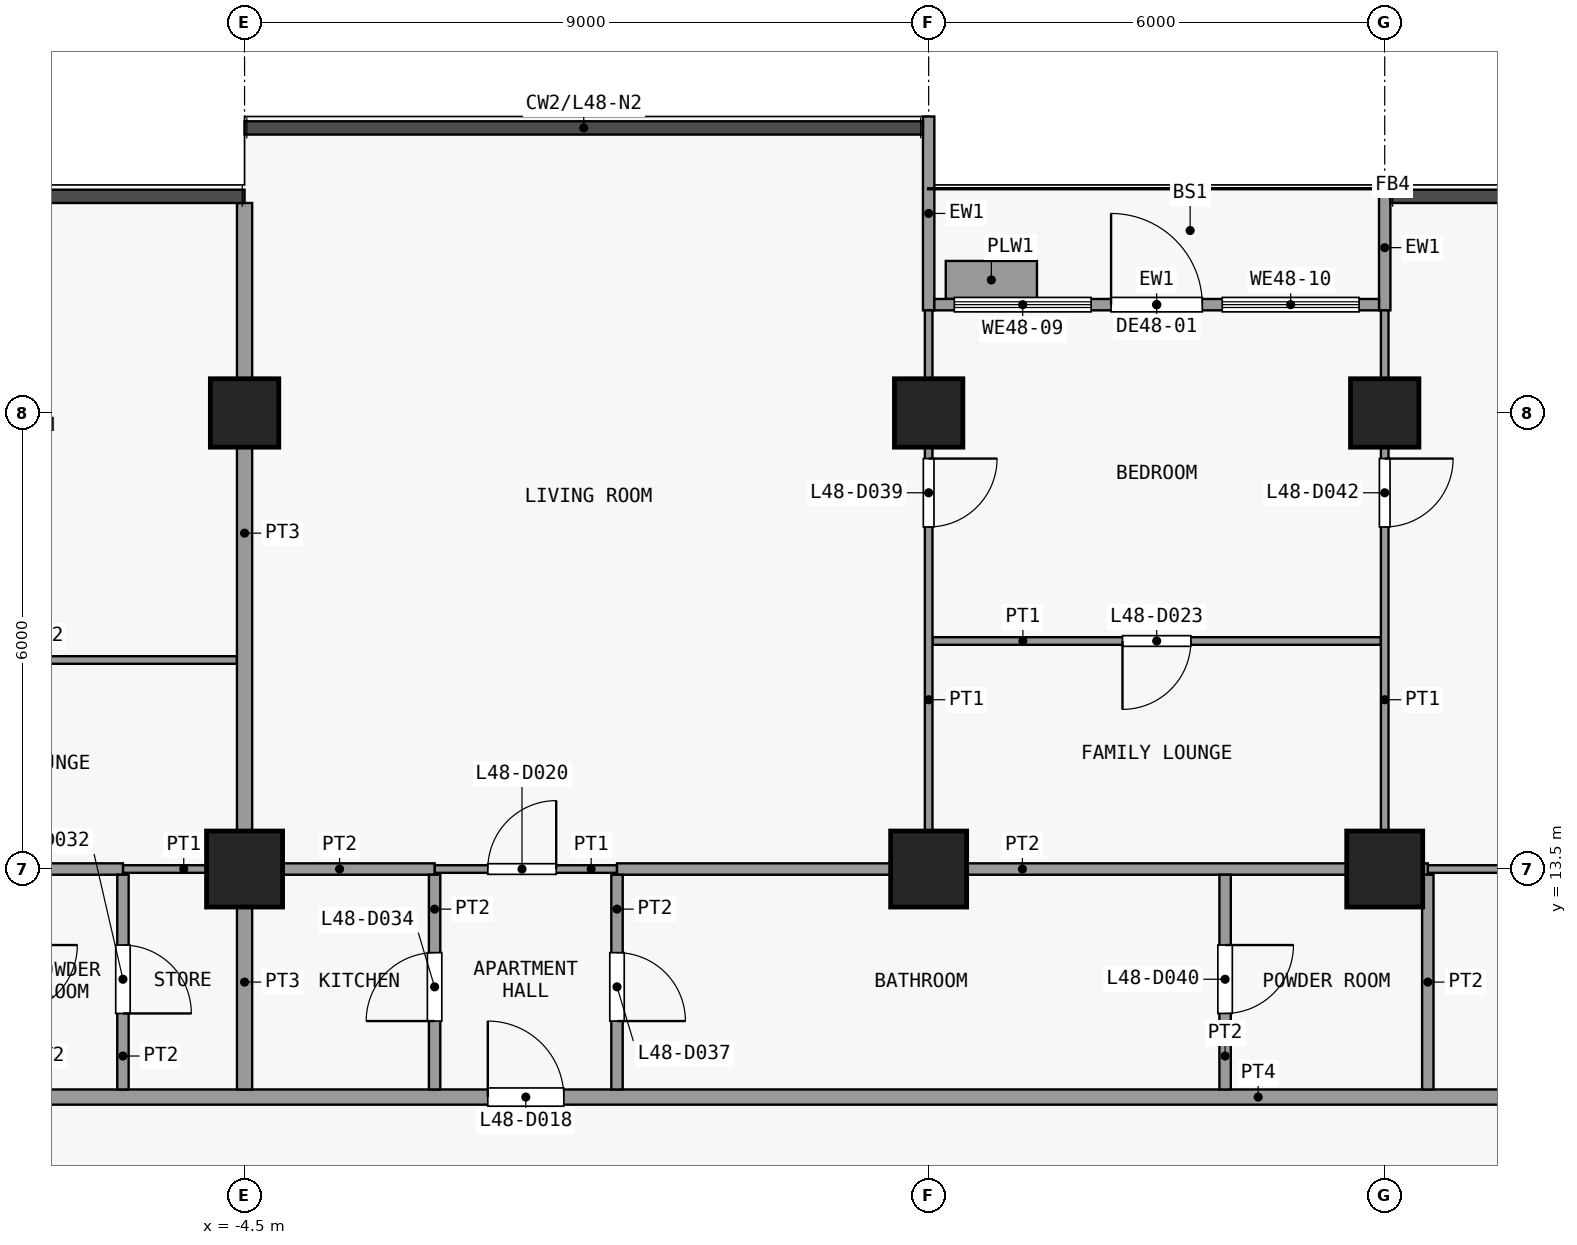
"""IFC4 building model, lengths in metres.
Left out: names, types, materials, properties, quantities, classifications, styles, units other than length and angle.
Written with IfcOpenShell. Run it as: python <this file> out.ifc"""

import sys

from ifc_helpers import new_model, si_unit, direction, frame, frame_2d, origin, origin_2d, place, context, subcontext, project, spatial, rectangle, extrude, element, fill, save


model = new_model("IFC4")
c1 = context("Model", 3, precision=1e-05, world=origin(), true_north=direction((0.0, 1.0)))
c2 = subcontext(c1, "Body", "Model", "MODEL_VIEW")
j1 = project(units=[si_unit("LENGTHUNIT", "METRE"), si_unit("PLANEANGLEUNIT", "RADIAN")], contexts=[c1])
p1 = place(None, origin())
s1 = spatial("IfcSite", under=j1, at=p1, CompositionType="ELEMENT")
p2 = place(p1, origin())
s2 = spatial("IfcBuilding", under=s1, at=p2, CompositionType="ELEMENT")
p3 = place(p2, frame((0.0, 0.0, 192.5)))
s3 = spatial("IfcBuildingStorey", under=s2, at=p3, CompositionType="ELEMENT", Elevation=192.5)
p4 = place(p3, frame((-4.5, 13.5, 0.0), z_axis=(0.0, 0.0, 1.0), x_axis=(1.0, 0.0, 0.0)))
e1 = element("IfcColumn", 1, at=p4, inside=s3, PredefinedType="COLUMN", context=c2, shape_type="SweptSolid", body=[
    extrude(rectangle(XDim=1.0, YDim=1.0, at=origin_2d()), origin(), (0.0, 0.0, 1.0), 3.6),
])
p5 = place(p3, frame((-4.5, 19.5, 0.0), z_axis=(0.0, 0.0, 1.0), x_axis=(1.0, 0.0, 0.0)))
e2 = element("IfcColumn", 2, at=p5, inside=s3, PredefinedType="COLUMN", context=c2, shape_type="SweptSolid", body=[
    extrude(rectangle(XDim=0.9, YDim=0.9, at=origin_2d()), origin(), (0.0, 0.0, 1.0), 3.6),
])
p6 = place(p3, frame((4.5, 13.5, 0.0), z_axis=(0.0, 0.0, 1.0), x_axis=(1.0, 0.0, 0.0)))
e3 = element("IfcColumn", 3, at=p6, inside=s3, PredefinedType="COLUMN", context=c2, shape_type="SweptSolid", body=[
    extrude(rectangle(XDim=1.0, YDim=1.0, at=origin_2d()), origin(), (0.0, 0.0, 1.0), 3.6),
])
p7 = place(p3, frame((4.5, 19.5, 0.0), z_axis=(0.0, 0.0, 1.0), x_axis=(1.0, 0.0, 0.0)))
e4 = element("IfcColumn", 4, at=p7, inside=s3, PredefinedType="COLUMN", context=c2, shape_type="SweptSolid", body=[
    extrude(rectangle(XDim=0.9, YDim=0.9, at=origin_2d()), origin(), (0.0, 0.0, 1.0), 3.6),
])
p8 = place(p3, frame((10.5, 13.5, 0.0), z_axis=(0.0, 0.0, 1.0), x_axis=(1.0, 0.0, 0.0)))
e5 = element("IfcColumn", 5, at=p8, inside=s3, PredefinedType="COLUMN", context=c2, shape_type="SweptSolid", body=[
    extrude(rectangle(XDim=1.0, YDim=1.0, at=origin_2d()), origin(), (0.0, 0.0, 1.0), 3.6),
])
p9 = place(p3, frame((10.5, 19.5, 0.0), z_axis=(0.0, 0.0, 1.0), x_axis=(1.0, 0.0, 0.0)))
e6 = element("IfcColumn", 6, at=p9, inside=s3, PredefinedType="COLUMN", context=c2, shape_type="SweptSolid", body=[
    extrude(rectangle(XDim=0.9, YDim=0.9, at=origin_2d()), origin(), (0.0, 0.0, 1.0), 3.6),
])
p10 = place(p3, frame((4.5, 20.85, 0.0), z_axis=(0.0, 0.0, 1.0), x_axis=(0.0, 1.0, 0.0)))
e7 = element("IfcWall", 7, at=p10, inside=s3, PredefinedType="SOLIDWALL", context=c2, shape_type="SweptSolid", body=[
    extrude(rectangle(XDim=2.55, YDim=0.15, at=frame_2d((1.275, 0.0))), origin(), (0.0, 0.0, 1.0), 3.3),
])
p11 = place(p3, frame((10.5, 20.85, 0.0), z_axis=(0.0, 0.0, 1.0), x_axis=(0.0, 1.0, 0.0)))
e8 = element("IfcWall", 8, at=p11, inside=s3, PredefinedType="SOLIDWALL", context=c2, shape_type="SweptSolid", body=[
    extrude(rectangle(XDim=1.65, YDim=0.15, at=frame_2d((0.825, 0.0))), origin(), (0.0, 0.0, 1.0), 3.3),
])
p12 = place(p3, frame((4.575, 20.925, 0.0), z_axis=(0.0, 0.0, 1.0), x_axis=(1.0, 0.0, 0.0)))
e9 = element("IfcWall", 9, at=p12, inside=s3, PredefinedType="SOLIDWALL", context=c2, shape_type="SweptSolid", body=[
    extrude(rectangle(XDim=5.85, YDim=0.15, at=frame_2d((2.925, 0.0))), origin(), (0.0, 0.0, 1.0), 3.3),
])
p13 = place(p12, frame((2.325, 0.0, 0.0)))
e10 = element("IfcOpeningElement", 10, at=p13, cuts=e9, PredefinedType="OPENING", context=c2, shape_type="SweptSolid", body=[
    extrude(rectangle(XDim=1.2, YDim=2.4, at=frame_2d((0.6, 1.2))), frame((0.0, 0.085, 0.0), z_axis=(0.0, -1.0, 0.0), x_axis=(1.0, 0.0, 0.0)), (0.0, 0.0, 1.0), 0.17),
])
p14 = place(p12, frame((0.262, 0.0, 0.9)))
e11 = element("IfcOpeningElement", 11, at=p14, cuts=e9, PredefinedType="OPENING", context=c2, shape_type="SweptSolid", body=[
    extrude(rectangle(XDim=1.8, YDim=2.1, at=frame_2d((0.9, 1.05))), frame((0.0, 0.085, 0.0), z_axis=(0.0, -1.0, 0.0), x_axis=(1.0, 0.0, 0.0)), (0.0, 0.0, 1.0), 0.17),
])
p15 = place(p12, frame((3.788, 0.0, 0.9)))
e12 = element("IfcOpeningElement", 12, at=p15, cuts=e9, PredefinedType="OPENING", context=c2, shape_type="SweptSolid", body=[
    extrude(rectangle(XDim=1.8, YDim=2.1, at=frame_2d((0.9, 1.05))), frame((0.0, 0.085, 0.0), z_axis=(0.0, -1.0, 0.0), x_axis=(1.0, 0.0, 0.0)), (0.0, 0.0, 1.0), 0.17),
])
p16 = place(p3, frame((4.725, 21.25, 0.0), z_axis=(0.0, 0.0, 1.0), x_axis=(1.0, 0.0, 0.0)))
e13 = element("IfcWall", 13, at=p16, inside=s3, PredefinedType="USERDEFINED", context=c2, shape_type="SweptSolid", body=[
    extrude(rectangle(XDim=1.2, YDim=0.5, at=frame_2d((0.6, 0.0))), origin(), (0.0, 0.0, 1.0), 0.9),
])
p17 = place(p3, frame((-19.35, 10.5, 0.0), z_axis=(0.0, 0.0, 1.0), x_axis=(1.0, 0.0, 0.0)))
e14 = element("IfcWall", 14, at=p17, inside=s3, PredefinedType="PARTITIONING", context=c2, shape_type="SweptSolid", body=[
    extrude(rectangle(XDim=37.2, YDim=0.2, at=frame_2d((18.6, 0.0))), origin(), (0.0, 0.0, 1.0), 3.3),
])
p18 = place(p17, frame((7.05, 0.0, 0.0)))
e15 = element("IfcOpeningElement", 15, at=p18, cuts=e14, PredefinedType="OPENING", context=c2, shape_type="SweptSolid", body=[
    extrude(rectangle(XDim=1.0, YDim=2.1, at=frame_2d((0.5, 1.05))), frame((0.0, 0.11, 0.0), z_axis=(0.0, -1.0, 0.0), x_axis=(1.0, 0.0, 0.0)), (0.0, 0.0, 1.0), 0.22),
])
p19 = place(p17, frame((18.05, 0.0, 0.0)))
e16 = element("IfcOpeningElement", 16, at=p19, cuts=e14, PredefinedType="OPENING", context=c2, shape_type="SweptSolid", body=[
    extrude(rectangle(XDim=1.0, YDim=2.1, at=frame_2d((0.5, 1.05))), frame((0.0, 0.11, 0.0), z_axis=(0.0, -1.0, 0.0), x_axis=(1.0, 0.0, 0.0)), (0.0, 0.0, 1.0), 0.22),
])
p20 = place(p3, frame((-6.1, 13.5, 0.0), z_axis=(0.0, 0.0, 1.0), x_axis=(1.0, 0.0, 0.0)))
e17 = element("IfcWall", 17, at=p20, inside=s3, PredefinedType="PARTITIONING", context=c2, shape_type="SweptSolid", body=[
    extrude(rectangle(XDim=1.6, YDim=0.1, at=frame_2d((0.8, 0.0))), origin(), (0.0, 0.0, 1.0), 3.3),
])
p21 = place(p3, frame((-2.0, 13.5, 0.0), z_axis=(0.0, 0.0, 1.0), x_axis=(1.0, 0.0, 0.0)))
e18 = element("IfcWall", 18, at=p21, inside=s3, PredefinedType="PARTITIONING", context=c2, shape_type="SweptSolid", body=[
    extrude(rectangle(XDim=2.4, YDim=0.1, at=frame_2d((1.2, 0.0))), origin(), (0.0, 0.0, 1.0), 3.3),
])
p22 = place(p21, frame((0.7, 0.0, 0.0)))
e19 = element("IfcOpeningElement", 19, at=p22, cuts=e18, PredefinedType="OPENING", context=c2, shape_type="SweptSolid", body=[
    extrude(rectangle(XDim=0.9, YDim=2.1, at=frame_2d((0.45, 1.05))), frame((0.0, 0.06, 0.0), z_axis=(0.0, -1.0, 0.0), x_axis=(1.0, 0.0, 0.0)), (0.0, 0.0, 1.0), 0.12),
])
p23 = place(p3, frame((11.067, 13.5, 0.0), z_axis=(0.0, 0.0, 1.0), x_axis=(1.0, 0.0, 0.0)))
e20 = element("IfcWall", 20, at=p23, inside=s3, PredefinedType="PARTITIONING", context=c2, shape_type="SweptSolid", body=[
    extrude(rectangle(XDim=6.783, YDim=0.1, at=frame_2d((3.392, 0.0))), origin(), (0.0, 0.0, 1.0), 3.3),
])
p24 = place(p23, frame((2.9, 0.0, 0.0)))
e21 = element("IfcOpeningElement", 21, at=p24, cuts=e20, PredefinedType="OPENING", context=c2, shape_type="SweptSolid", body=[
    extrude(rectangle(XDim=0.9, YDim=2.1, at=frame_2d((0.45, 1.05))), frame((0.0, 0.06, 0.0), z_axis=(0.0, -1.0, 0.0), x_axis=(1.0, 0.0, 0.0)), (0.0, 0.0, 1.0), 0.12),
])
p25 = place(p3, frame((-10.5, 13.5, 0.0), z_axis=(0.0, 0.0, 1.0), x_axis=(1.0, 0.0, 0.0)))
e22 = element("IfcWall", 22, at=p25, inside=s3, PredefinedType="PARTITIONING", context=c2, shape_type="SweptSolid", body=[
    extrude(rectangle(XDim=4.4, YDim=0.15, at=frame_2d((2.2, 0.0))), origin(), (0.0, 0.0, 1.0), 3.3),
])
p26 = place(p3, frame((-4.5, 13.5, 0.0), z_axis=(0.0, 0.0, 1.0), x_axis=(1.0, 0.0, 0.0)))
e23 = element("IfcWall", 23, at=p26, inside=s3, PredefinedType="PARTITIONING", context=c2, shape_type="SweptSolid", body=[
    extrude(rectangle(XDim=2.5, YDim=0.15, at=frame_2d((1.25, 0.0))), origin(), (0.0, 0.0, 1.0), 3.3),
])
p27 = place(p3, frame((0.4, 13.5, 0.0), z_axis=(0.0, 0.0, 1.0), x_axis=(1.0, 0.0, 0.0)))
e24 = element("IfcWall", 24, at=p27, inside=s3, PredefinedType="PARTITIONING", context=c2, shape_type="SweptSolid", body=[
    extrude(rectangle(XDim=10.667, YDim=0.15, at=frame_2d((5.333, 0.0))), origin(), (0.0, 0.0, 1.0), 3.3),
])
p28 = place(p3, frame((-10.45, 16.25, 0.0), z_axis=(0.0, 0.0, 1.0), x_axis=(1.0, 0.0, 0.0)))
e25 = element("IfcWall", 25, at=p28, inside=s3, PredefinedType="PARTITIONING", context=c2, shape_type="SweptSolid", body=[
    extrude(rectangle(XDim=5.85, YDim=0.1, at=frame_2d((2.925, 0.0))), origin(), (0.0, 0.0, 1.0), 3.3),
])
p29 = place(p28, frame((2.5, 0.0, 0.0)))
e26 = element("IfcOpeningElement", 26, at=p29, cuts=e25, PredefinedType="OPENING", context=c2, shape_type="SweptSolid", body=[
    extrude(rectangle(XDim=0.9, YDim=2.1, at=frame_2d((0.45, 1.05))), frame((0.0, 0.06, 0.0), z_axis=(0.0, -1.0, 0.0), x_axis=(1.0, 0.0, 0.0)), (0.0, 0.0, 1.0), 0.12),
])
p30 = place(p3, frame((4.55, 16.5, 0.0), z_axis=(0.0, 0.0, 1.0), x_axis=(1.0, 0.0, 0.0)))
e27 = element("IfcWall", 27, at=p30, inside=s3, PredefinedType="PARTITIONING", context=c2, shape_type="SweptSolid", body=[
    extrude(rectangle(XDim=5.9, YDim=0.1, at=frame_2d((2.95, 0.0))), origin(), (0.0, 0.0, 1.0), 3.3),
])
p31 = place(p30, frame((2.5, 0.0, 0.0)))
e28 = element("IfcOpeningElement", 28, at=p31, cuts=e27, PredefinedType="OPENING", context=c2, shape_type="SweptSolid", body=[
    extrude(rectangle(XDim=0.9, YDim=2.1, at=frame_2d((0.45, 1.05))), frame((0.0, 0.06, 0.0), z_axis=(0.0, -1.0, 0.0), x_axis=(1.0, 0.0, 0.0)), (0.0, 0.0, 1.0), 0.12),
])
p32 = place(p3, frame((-6.1, 10.6, 0.0), z_axis=(0.0, 0.0, 1.0), x_axis=(0.0, 1.0, 0.0)))
e29 = element("IfcWall", 29, at=p32, inside=s3, PredefinedType="PARTITIONING", context=c2, shape_type="SweptSolid", body=[
    extrude(rectangle(XDim=2.825, YDim=0.15, at=frame_2d((1.413, 0.0))), origin(), (0.0, 0.0, 1.0), 3.3),
])
p33 = place(p32, frame((1.0, 0.0, 0.0)))
e30 = element("IfcOpeningElement", 30, at=p33, cuts=e29, PredefinedType="OPENING", context=c2, shape_type="SweptSolid", body=[
    extrude(rectangle(XDim=0.9, YDim=2.1, at=frame_2d((0.45, 1.05))), frame((0.0, 0.085, 0.0), z_axis=(0.0, -1.0, 0.0), x_axis=(1.0, 0.0, 0.0)), (0.0, 0.0, 1.0), 0.17),
])
p34 = place(p3, frame((-4.5, 10.6, 0.0), z_axis=(0.0, 0.0, 1.0), x_axis=(0.0, 1.0, 0.0)))
e31 = element("IfcWall", 31, at=p34, inside=s3, PredefinedType="PARTITIONING", context=c2, shape_type="SweptSolid", body=[
    extrude(rectangle(XDim=2.825, YDim=0.2, at=frame_2d((1.413, 0.0))), origin(), (0.0, 0.0, 1.0), 3.3),
])
p35 = place(p3, frame((-4.5, 13.575, 0.0), z_axis=(0.0, 0.0, 1.0), x_axis=(0.0, 1.0, 0.0)))
e32 = element("IfcWall", 32, at=p35, inside=s3, PredefinedType="PARTITIONING", context=c2, shape_type="SweptSolid", body=[
    extrude(rectangle(XDim=8.688, YDim=0.2, at=frame_2d((4.344, 0.0))), origin(), (0.0, 0.0, 1.0), 3.3),
])
p36 = place(p3, frame((-2.0, 10.6, 0.0), z_axis=(0.0, 0.0, 1.0), x_axis=(0.0, 1.0, 0.0)))
e33 = element("IfcWall", 33, at=p36, inside=s3, PredefinedType="PARTITIONING", context=c2, shape_type="SweptSolid", body=[
    extrude(rectangle(XDim=2.825, YDim=0.15, at=frame_2d((1.413, 0.0))), origin(), (0.0, 0.0, 1.0), 3.3),
])
p37 = place(p36, frame((0.9, 0.0, 0.0)))
e34 = element("IfcOpeningElement", 34, at=p37, cuts=e33, PredefinedType="OPENING", context=c2, shape_type="SweptSolid", body=[
    extrude(rectangle(XDim=0.9, YDim=2.1, at=frame_2d((0.45, 1.05))), frame((0.0, 0.085, 0.0), z_axis=(0.0, -1.0, 0.0), x_axis=(1.0, 0.0, 0.0)), (0.0, 0.0, 1.0), 0.17),
])
p38 = place(p3, frame((0.4, 10.6, 0.0), z_axis=(0.0, 0.0, 1.0), x_axis=(0.0, 1.0, 0.0)))
e35 = element("IfcWall", 35, at=p38, inside=s3, PredefinedType="PARTITIONING", context=c2, shape_type="SweptSolid", body=[
    extrude(rectangle(XDim=2.825, YDim=0.15, at=frame_2d((1.413, 0.0))), origin(), (0.0, 0.0, 1.0), 3.3),
])
p39 = place(p38, frame((0.9, 0.0, 0.0)))
e36 = element("IfcOpeningElement", 36, at=p39, cuts=e35, PredefinedType="OPENING", context=c2, shape_type="SweptSolid", body=[
    extrude(rectangle(XDim=0.9, YDim=2.1, at=frame_2d((0.45, 1.05))), frame((0.0, 0.085, 0.0), z_axis=(0.0, -1.0, 0.0), x_axis=(1.0, 0.0, 0.0)), (0.0, 0.0, 1.0), 0.17),
])
p40 = place(p3, frame((4.5, 13.575, 0.0), z_axis=(0.0, 0.0, 1.0), x_axis=(0.0, 1.0, 0.0)))
e37 = element("IfcWall", 37, at=p40, inside=s3, PredefinedType="PARTITIONING", context=c2, shape_type="SweptSolid", body=[
    extrude(rectangle(XDim=7.275, YDim=0.1, at=frame_2d((3.638, 0.0))), origin(), (0.0, 0.0, 1.0), 3.3),
])
p41 = place(p40, frame((4.425, 0.0, 0.0)))
e38 = element("IfcOpeningElement", 38, at=p41, cuts=e37, PredefinedType="OPENING", context=c2, shape_type="SweptSolid", body=[
    extrude(rectangle(XDim=0.9, YDim=2.1, at=frame_2d((0.45, 1.05))), frame((0.0, 0.06, 0.0), z_axis=(0.0, -1.0, 0.0), x_axis=(1.0, 0.0, 0.0)), (0.0, 0.0, 1.0), 0.12),
])
p42 = place(p3, frame((8.4, 10.6, 0.0), z_axis=(0.0, 0.0, 1.0), x_axis=(0.0, 1.0, 0.0)))
e39 = element("IfcWall", 39, at=p42, inside=s3, PredefinedType="PARTITIONING", context=c2, shape_type="SweptSolid", body=[
    extrude(rectangle(XDim=2.825, YDim=0.15, at=frame_2d((1.413, 0.0))), origin(), (0.0, 0.0, 1.0), 3.3),
])
p43 = place(p42, frame((1.0, 0.0, 0.0)))
e40 = element("IfcOpeningElement", 40, at=p43, cuts=e39, PredefinedType="OPENING", context=c2, shape_type="SweptSolid", body=[
    extrude(rectangle(XDim=0.9, YDim=2.1, at=frame_2d((0.45, 1.05))), frame((0.0, 0.085, 0.0), z_axis=(0.0, -1.0, 0.0), x_axis=(1.0, 0.0, 0.0)), (0.0, 0.0, 1.0), 0.17),
])
p44 = place(p3, frame((10.5, 13.575, 0.0), z_axis=(0.0, 0.0, 1.0), x_axis=(0.0, 1.0, 0.0)))
e41 = element("IfcWall", 41, at=p44, inside=s3, PredefinedType="PARTITIONING", context=c2, shape_type="SweptSolid", body=[
    extrude(rectangle(XDim=7.275, YDim=0.1, at=frame_2d((3.638, 0.0))), origin(), (0.0, 0.0, 1.0), 3.3),
])
p45 = place(p44, frame((4.425, 0.0, 0.0)))
e42 = element("IfcOpeningElement", 42, at=p45, cuts=e41, PredefinedType="OPENING", context=c2, shape_type="SweptSolid", body=[
    extrude(rectangle(XDim=0.9, YDim=2.1, at=frame_2d((0.45, 1.05))), frame((0.0, 0.06, 0.0), z_axis=(0.0, -1.0, 0.0), x_axis=(1.0, 0.0, 0.0)), (0.0, 0.0, 1.0), 0.12),
])
p46 = place(p3, frame((11.067, 10.6, 0.0), z_axis=(0.0, 0.0, 1.0), x_axis=(0.0, 1.0, 0.0)))
e43 = element("IfcWall", 43, at=p46, inside=s3, PredefinedType="PARTITIONING", context=c2, shape_type="SweptSolid", body=[
    extrude(rectangle(XDim=2.825, YDim=0.15, at=frame_2d((1.413, 0.0))), origin(), (0.0, 0.0, 1.0), 3.3),
])
p47 = place(p13, origin())
e44 = element("IfcDoor", 44, at=p47, inside=s3, OperationType="SINGLE_SWING_LEFT", PredefinedType="DOOR", context=c2, shape_type="SweptSolid", body=[
    extrude(rectangle(XDim=1.2, YDim=2.4, at=frame_2d((0.6, 1.2))), frame((0.0, 0.025, 0.0), z_axis=(0.0, -1.0, 0.0), x_axis=(1.0, 0.0, 0.0)), (0.0, 0.0, 1.0), 0.05),
])
fill(e10, e44)
p48 = place(p14, origin())
e45 = element("IfcWindow", 45, at=p48, inside=s3, PartitioningType="SINGLE_PANEL", PredefinedType="WINDOW", context=c2, shape_type="SweptSolid", body=[
    extrude(rectangle(XDim=1.8, YDim=2.1, at=frame_2d((0.9, 1.05))), frame((0.0, 0.03, 0.0), z_axis=(0.0, -1.0, 0.0), x_axis=(1.0, 0.0, 0.0)), (0.0, 0.0, 1.0), 0.06),
])
fill(e11, e45)
p49 = place(p15, origin())
e46 = element("IfcWindow", 46, at=p49, inside=s3, PartitioningType="SINGLE_PANEL", PredefinedType="WINDOW", context=c2, shape_type="SweptSolid", body=[
    extrude(rectangle(XDim=1.8, YDim=2.1, at=frame_2d((0.9, 1.05))), frame((0.0, 0.03, 0.0), z_axis=(0.0, -1.0, 0.0), x_axis=(1.0, 0.0, 0.0)), (0.0, 0.0, 1.0), 0.06),
])
fill(e12, e46)
p50 = place(p19, origin())
e47 = element("IfcDoor", 47, at=p50, inside=s3, OperationType="SINGLE_SWING_RIGHT", PredefinedType="DOOR", context=c2, shape_type="SweptSolid", body=[
    extrude(rectangle(XDim=1.0, YDim=2.1, at=frame_2d((0.5, 1.05))), frame((0.0, 0.025, 0.0), z_axis=(0.0, -1.0, 0.0), x_axis=(1.0, 0.0, 0.0)), (0.0, 0.0, 1.0), 0.05),
])
fill(e16, e47)
p51 = place(p22, origin())
e48 = element("IfcDoor", 48, at=p51, inside=s3, OperationType="SINGLE_SWING_LEFT", PredefinedType="DOOR", context=c2, shape_type="SweptSolid", body=[
    extrude(rectangle(XDim=0.9, YDim=2.1, at=frame_2d((0.45, 1.05))), frame((0.0, 0.025, 0.0), z_axis=(0.0, -1.0, 0.0), x_axis=(1.0, 0.0, 0.0)), (0.0, 0.0, 1.0), 0.05),
])
fill(e19, e48)
p52 = place(p31, origin())
e49 = element("IfcDoor", 49, at=p52, inside=s3, OperationType="SINGLE_SWING_LEFT", PredefinedType="DOOR", context=c2, shape_type="SweptSolid", body=[
    extrude(rectangle(XDim=0.9, YDim=2.1, at=frame_2d((0.45, 1.05))), frame((0.0, 0.025, 0.0), z_axis=(0.0, -1.0, 0.0), x_axis=(1.0, 0.0, 0.0)), (0.0, 0.0, 1.0), 0.05),
])
fill(e28, e49)
p53 = place(p33, origin())
e50 = element("IfcDoor", 50, at=p53, inside=s3, OperationType="SINGLE_SWING_LEFT", PredefinedType="DOOR", context=c2, shape_type="SweptSolid", body=[
    extrude(rectangle(XDim=0.9, YDim=2.1, at=frame_2d((0.45, 1.05))), frame((0.0, 0.025, 0.0), z_axis=(0.0, -1.0, 0.0), x_axis=(1.0, 0.0, 0.0)), (0.0, 0.0, 1.0), 0.05),
])
fill(e30, e50)
p54 = place(p37, origin())
e51 = element("IfcDoor", 51, at=p54, inside=s3, OperationType="SINGLE_SWING_RIGHT", PredefinedType="DOOR", context=c2, shape_type="SweptSolid", body=[
    extrude(rectangle(XDim=0.9, YDim=2.1, at=frame_2d((0.45, 1.05))), frame((0.0, 0.025, 0.0), z_axis=(0.0, -1.0, 0.0), x_axis=(1.0, 0.0, 0.0)), (0.0, 0.0, 1.0), 0.05),
])
fill(e34, e51)
p55 = place(p39, origin())
e52 = element("IfcDoor", 52, at=p55, inside=s3, OperationType="SINGLE_SWING_LEFT", PredefinedType="DOOR", context=c2, shape_type="SweptSolid", body=[
    extrude(rectangle(XDim=0.9, YDim=2.1, at=frame_2d((0.45, 1.05))), frame((0.0, 0.025, 0.0), z_axis=(0.0, -1.0, 0.0), x_axis=(1.0, 0.0, 0.0)), (0.0, 0.0, 1.0), 0.05),
])
fill(e36, e52)
p56 = place(p41, origin())
e53 = element("IfcDoor", 53, at=p56, inside=s3, OperationType="SINGLE_SWING_RIGHT", PredefinedType="DOOR", context=c2, shape_type="SweptSolid", body=[
    extrude(rectangle(XDim=0.9, YDim=2.1, at=frame_2d((0.45, 1.05))), frame((0.0, 0.025, 0.0), z_axis=(0.0, -1.0, 0.0), x_axis=(1.0, 0.0, 0.0)), (0.0, 0.0, 1.0), 0.05),
])
fill(e38, e53)
p57 = place(p43, origin())
e54 = element("IfcDoor", 54, at=p57, inside=s3, OperationType="SINGLE_SWING_RIGHT", PredefinedType="DOOR", context=c2, shape_type="SweptSolid", body=[
    extrude(rectangle(XDim=0.9, YDim=2.1, at=frame_2d((0.45, 1.05))), frame((0.0, 0.025, 0.0), z_axis=(0.0, -1.0, 0.0), x_axis=(1.0, 0.0, 0.0)), (0.0, 0.0, 1.0), 0.05),
])
fill(e40, e54)
p58 = place(p45, origin())
e55 = element("IfcDoor", 55, at=p58, inside=s3, OperationType="SINGLE_SWING_RIGHT", PredefinedType="DOOR", context=c2, shape_type="SweptSolid", body=[
    extrude(rectangle(XDim=0.9, YDim=2.1, at=frame_2d((0.45, 1.05))), frame((0.0, 0.025, 0.0), z_axis=(0.0, -1.0, 0.0), x_axis=(1.0, 0.0, 0.0)), (0.0, 0.0, 1.0), 0.05),
])
fill(e42, e55)
save(model, sys.argv[1])
